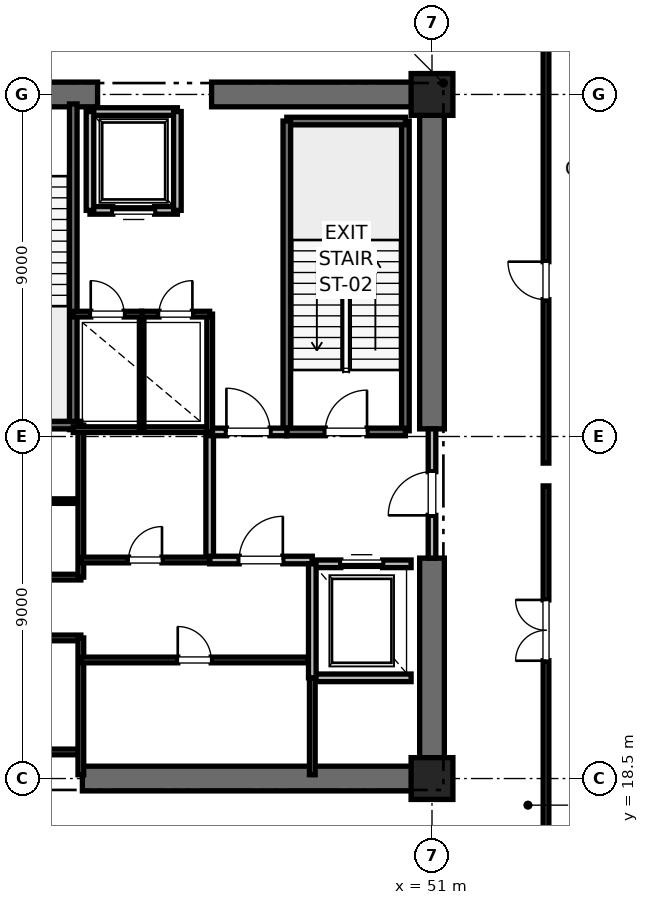
"""IFC4 building model, lengths in metres.
Left out: names, types, materials, properties, quantities, classifications, styles, units other than length and angle.
Written with IfcOpenShell. Run it as: python <this file> out.ifc"""

import sys

from ifc_helpers import new_model, si_unit, direction, frame, frame_2d, origin, origin_2d, place, context, subcontext, project, spatial, rectangle, extrude, element, fill, save


model = new_model("IFC4")
c1 = context("Model", 3, precision=1e-05, world=origin(), true_north=direction((0.0, 1.0)))
c2 = subcontext(c1, "Body", "Model", "MODEL_VIEW")
j1 = project(units=[si_unit("LENGTHUNIT", "METRE"), si_unit("PLANEANGLEUNIT", "RADIAN")], contexts=[c1])
p1 = place(None, origin())
s1 = spatial("IfcSite", under=j1, at=p1, CompositionType="ELEMENT")
p2 = place(p1, origin())
s2 = spatial("IfcBuilding", under=s1, at=p2, CompositionType="ELEMENT")
p3 = place(p2, frame((0.0, 0.0, -4.5)))
s3 = spatial("IfcBuildingStorey", under=s2, at=p3, CompositionType="ELEMENT", Elevation=-4.5)
for number, where, z_axis, x_axis in (
    (1, (51.0, 18.5, 0.0), (0.0, 0.0, 1.0), (1.0, 0.0, 0.0)),
    (2, (51.0, 36.5, 0.0), (0.0, 0.0, 1.0), (1.0, 0.0, 0.0)),
):
    element("IfcColumn", number, at=place(p3, frame(where, z_axis=z_axis, x_axis=x_axis)), inside=s3, PredefinedType="PILASTER", context=c2, shape_type="SweptSolid", body=[
        extrude(rectangle(XDim=1.1, YDim=1.1, at=origin_2d()), origin(), (0.0, 0.0, 1.0), 4.5),
    ])
p4 = place(p3, frame((41.8, 18.5, 0.0), z_axis=(0.0, 0.0, 1.0), x_axis=(1.0, 0.0, 0.0)))
e3 = element("IfcWall", 3, at=p4, inside=s3, PredefinedType="SHEAR", context=c2, shape_type="SweptSolid", body=[
    extrude(rectangle(XDim=9.2, YDim=0.65, at=frame_2d((4.6, 0.0))), origin(), (0.0, 0.0, 1.0), 4.22),
])
p5 = place(p3, frame((37.8, 36.5, 0.0), z_axis=(0.0, 0.0, 1.0), x_axis=(1.0, 0.0, 0.0)))
e4 = element("IfcWall", 4, at=p5, inside=s3, PredefinedType="SHEAR", context=c2, shape_type="SweptSolid", body=[
    extrude(rectangle(XDim=4.4, YDim=0.65, at=frame_2d((2.2, 0.0))), origin(), (0.0, 0.0, 1.0), 4.22),
])
p6 = place(p5, frame((1.65, 0.0, 0.0)))
e5 = element("IfcOpeningElement", 5, at=p6, cuts=e4, PredefinedType="OPENING", context=c2, shape_type="SweptSolid", body=[
    extrude(rectangle(XDim=1.1, YDim=2.15, at=frame_2d((0.55, 1.075))), frame((0.0, 0.325, 0.0), z_axis=(0.0, -1.0, 0.0), x_axis=(1.0, 0.0, 0.0)), (0.0, 0.0, 1.0), 0.65),
])
for number, where, z_axis, x_axis in (
    (6, (45.2, 36.5, 0.0), (0.0, 0.0, 1.0), (1.0, 0.0, 0.0)),
    (7, (51.0, 18.5, 0.0), (0.0, 0.0, 1.0), (0.0, 1.0, 0.0)),
):
    element("IfcWall", number, at=place(p3, frame(where, z_axis=z_axis, x_axis=x_axis)), inside=s3, PredefinedType="SHEAR", context=c2, shape_type="SweptSolid", body=[
        extrude(rectangle(XDim=5.8, YDim=0.65, at=frame_2d((2.9, 0.0))), origin(), (0.0, 0.0, 1.0), 4.22),
    ])
p7 = place(p3, frame((51.0, 27.7, 0.0), z_axis=(0.0, 0.0, 1.0), x_axis=(0.0, 1.0, 0.0)))
e8 = element("IfcWall", 8, at=p7, inside=s3, PredefinedType="SHEAR", context=c2, shape_type="SweptSolid", body=[
    extrude(rectangle(XDim=8.8, YDim=0.65, at=frame_2d((4.4, 0.0))), origin(), (0.0, 0.0, 1.0), 4.22),
])
p8 = place(p3, frame((50.3, 27.65, 0.0), z_axis=(0.0, 0.0, 1.0), x_axis=(0.0, 1.0, 0.0)))
e9 = element("IfcWall", 9, at=p8, inside=s3, PredefinedType="SOLIDWALL", context=c2, shape_type="SweptSolid", body=[
    extrude(rectangle(XDim=8.15, YDim=0.2, at=frame_2d((4.075, 0.0))), origin(), (0.0, 0.0, 1.0), 4.22),
])
p9 = place(p3, frame((47.18, 35.8, 0.0), z_axis=(0.0, 0.0, 1.0), x_axis=(1.0, 0.0, 0.0)))
e10 = element("IfcWall", 10, at=p9, inside=s3, PredefinedType="SOLIDWALL", context=c2, shape_type="SweptSolid", body=[
    extrude(rectangle(XDim=3.12, YDim=0.2, at=frame_2d((1.56, 0.0))), origin(), (0.0, 0.0, 1.0), 4.22),
])
p10 = place(p3, frame((47.18, 27.62, 0.0), z_axis=(0.0, 0.0, 1.0), x_axis=(0.0, 1.0, 0.0)))
e11 = element("IfcWall", 11, at=p10, inside=s3, PredefinedType="SOLIDWALL", context=c2, shape_type="SweptSolid", body=[
    extrude(rectangle(XDim=8.18, YDim=0.2, at=frame_2d((4.09, 0.0))), origin(), (0.0, 0.0, 1.0), 4.22),
])
p11 = place(p3, frame((47.18, 27.62, 0.0), z_axis=(0.0, 0.0, 1.0), x_axis=(1.0, 0.0, 0.0)))
e12 = element("IfcWall", 12, at=p11, inside=s3, PredefinedType="SOLIDWALL", context=c2, shape_type="SweptSolid", body=[
    extrude(rectangle(XDim=3.12, YDim=0.2, at=frame_2d((1.56, 0.0))), origin(), (0.0, 0.0, 1.0), 4.22),
])
p12 = place(p11, frame((1.01, 0.0, 0.0)))
e13 = element("IfcOpeningElement", 13, at=p12, cuts=e12, PredefinedType="OPENING", context=c2, shape_type="SweptSolid", body=[
    extrude(rectangle(XDim=1.1, YDim=2.15, at=frame_2d((0.55, 1.075))), frame((0.0, 0.1, 0.0), z_axis=(0.0, -1.0, 0.0), x_axis=(1.0, 0.0, 0.0)), (0.0, 0.0, 1.0), 0.2),
])
p13 = place(p3, frame((41.56, 27.68, 0.0), z_axis=(0.0, 0.0, 1.0), x_axis=(0.0, 1.0, 0.0)))
e14 = element("IfcWall", 14, at=p13, inside=s3, PredefinedType="SOLIDWALL", context=c2, shape_type="SweptSolid", body=[
    extrude(rectangle(XDim=8.57, YDim=0.2, at=frame_2d((4.285, 0.0))), origin(), (0.0, 0.0, 1.0), 4.22),
])
p14 = place(p3, frame((38.44, 27.8, 0.0), z_axis=(0.0, 0.0, 1.0), x_axis=(1.0, 0.0, 0.0)))
e15 = element("IfcWall", 15, at=p14, inside=s3, PredefinedType="SOLIDWALL", context=c2, shape_type="SweptSolid", body=[
    extrude(rectangle(XDim=3.32, YDim=0.2, at=frame_2d((1.66, 0.0))), origin(), (0.0, 0.0, 1.0), 4.22),
])
p15 = place(p3, frame((45.15, 24.25, 0.0), z_axis=(0.0, 0.0, 1.0), x_axis=(0.0, 1.0, 0.0)))
e16 = element("IfcWall", 16, at=p15, inside=s3, PredefinedType="PARTITIONING", context=c2, shape_type="SweptSolid", body=[
    extrude(rectangle(XDim=3.37, YDim=0.2, at=frame_2d((1.685, 0.0))), origin(), (0.0, 0.0, 1.0), 4.22),
])
p16 = place(p3, frame((45.15, 24.25, 0.0), z_axis=(0.0, 0.0, 1.0), x_axis=(1.0, 0.0, 0.0)))
e17 = element("IfcWall", 17, at=p16, inside=s3, PredefinedType="PARTITIONING", context=c2, shape_type="SweptSolid", body=[
    extrude(rectangle(XDim=2.7, YDim=0.2, at=frame_2d((1.35, 0.0))), origin(), (0.0, 0.0, 1.0), 4.22),
])
p17 = place(p16, frame((0.775, 0.0, 0.0)))
e18 = element("IfcOpeningElement", 18, at=p17, cuts=e17, PredefinedType="OPENING", context=c2, shape_type="SweptSolid", body=[
    extrude(rectangle(XDim=1.15, YDim=2.2, at=frame_2d((0.575, 1.1))), frame((0.0, 0.1, 0.0), z_axis=(0.0, -1.0, 0.0), x_axis=(1.0, 0.0, 0.0)), (0.0, 0.0, 1.0), 0.2),
])
p18 = place(p3, frame((45.15, 27.62, 0.0), z_axis=(0.0, 0.0, 1.0), x_axis=(1.0, 0.0, 0.0)))
e19 = element("IfcWall", 19, at=p18, inside=s3, PredefinedType="PARTITIONING", context=c2, shape_type="SweptSolid", body=[
    extrude(rectangle(XDim=2.03, YDim=0.2, at=frame_2d((1.015, 0.0))), origin(), (0.0, 0.0, 1.0), 4.22),
])
p19 = place(p18, frame((0.44, 0.0, 0.0)))
e20 = element("IfcOpeningElement", 20, at=p19, cuts=e19, PredefinedType="OPENING", context=c2, shape_type="SweptSolid", body=[
    extrude(rectangle(XDim=1.15, YDim=2.2, at=frame_2d((0.575, 1.1))), frame((0.0, 0.1, 0.0), z_axis=(0.0, -1.0, 0.0), x_axis=(1.0, 0.0, 0.0)), (0.0, 0.0, 1.0), 0.2),
])
p20 = place(p3, frame((51.0, 24.3, 0.0), z_axis=(0.0, 0.0, 1.0), x_axis=(0.0, 1.0, 0.0)))
e21 = element("IfcWall", 21, at=p20, inside=s3, PredefinedType="PARTITIONING", context=c2, shape_type="SweptSolid", body=[
    extrude(rectangle(XDim=3.4, YDim=0.2, at=frame_2d((1.7, 0.0))), origin(), (0.0, 0.0, 1.0), 3.0),
])
p21 = place(p20, frame((1.125, 0.0, 0.0)))
e22 = element("IfcOpeningElement", 22, at=p21, cuts=e21, PredefinedType="OPENING", context=c2, shape_type="SweptSolid", body=[
    extrude(rectangle(XDim=1.15, YDim=2.2, at=frame_2d((0.575, 1.1))), frame((0.0, 0.1, 0.0), z_axis=(0.0, -1.0, 0.0), x_axis=(1.0, 0.0, 0.0)), (0.0, 0.0, 1.0), 0.2),
])
p22 = place(p3, frame((47.85, 21.15, 0.0), z_axis=(0.0, 0.0, 1.0), x_axis=(1.0, 0.0, 0.0)))
e23 = element("IfcWall", 23, at=p22, inside=s3, PredefinedType="SOLIDWALL", context=c2, shape_type="SweptSolid", body=[
    extrude(rectangle(XDim=2.6, YDim=0.2, at=frame_2d((1.3, 0.0))), origin(), (0.0, 0.0, 1.0), 4.22),
])
p23 = place(p3, frame((50.45, 24.15, 0.0), z_axis=(0.0, 0.0, 1.0), x_axis=(-1.0, 0.0, 0.0)))
e24 = element("IfcWall", 24, at=p23, inside=s3, PredefinedType="SOLIDWALL", context=c2, shape_type="SweptSolid", body=[
    extrude(rectangle(XDim=2.6, YDim=0.2, at=frame_2d((1.3, 0.0))), origin(), (0.0, 0.0, 1.0), 3.0),
])
p24 = place(p23, frame((0.75, 0.0, 0.0)))
e25 = element("IfcOpeningElement", 25, at=p24, cuts=e24, PredefinedType="OPENING", context=c2, shape_type="SweptSolid", body=[
    extrude(rectangle(XDim=1.1, YDim=2.2, at=frame_2d((0.55, 1.1))), frame((0.0, 0.1, 0.0), z_axis=(0.0, -1.0, 0.0), x_axis=(1.0, 0.0, 0.0)), (0.0, 0.0, 1.0), 0.2),
])
p25 = place(p3, frame((47.85, 24.15, 0.0), z_axis=(0.0, 0.0, 1.0), x_axis=(0.0, -1.0, 0.0)))
e26 = element("IfcWall", 26, at=p25, inside=s3, PredefinedType="SOLIDWALL", context=c2, shape_type="SweptSolid", body=[
    extrude(rectangle(XDim=3.0, YDim=0.2, at=frame_2d((1.5, 0.0))), origin(), (0.0, 0.0, 1.0), 4.22),
])
p26 = place(p3, frame((42.0, 33.45, 0.0), z_axis=(0.0, 0.0, 1.0), x_axis=(1.0, 0.0, 0.0)))
e27 = element("IfcWall", 27, at=p26, inside=s3, PredefinedType="SOLIDWALL", context=c2, shape_type="SweptSolid", body=[
    extrude(rectangle(XDim=2.3, YDim=0.2, at=frame_2d((1.15, 0.0))), origin(), (0.0, 0.0, 1.0), 4.22),
])
p27 = place(p26, frame((0.6, 0.0, 0.0)))
e28 = element("IfcOpeningElement", 28, at=p27, cuts=e27, PredefinedType="OPENING", context=c2, shape_type="SweptSolid", body=[
    extrude(rectangle(XDim=1.1, YDim=2.2, at=frame_2d((0.55, 1.1))), frame((0.0, 0.1, 0.0), z_axis=(0.0, -1.0, 0.0), x_axis=(1.0, 0.0, 0.0)), (0.0, 0.0, 1.0), 0.2),
])
p28 = place(p3, frame((44.3, 36.05, 0.0), z_axis=(0.0, 0.0, 1.0), x_axis=(-1.0, 0.0, 0.0)))
e29 = element("IfcWall", 29, at=p28, inside=s3, PredefinedType="SOLIDWALL", context=c2, shape_type="SweptSolid", body=[
    extrude(rectangle(XDim=2.3, YDim=0.2, at=frame_2d((1.15, 0.0))), origin(), (0.0, 0.0, 1.0), 3.0),
])
for number, where, z_axis, x_axis in (
    (30, (42.0, 36.05, 0.0), (0.0, 0.0, 1.0), (0.0, -1.0, 0.0)),
    (31, (44.3, 33.45, 0.0), (0.0, 0.0, 1.0), (0.0, 1.0, 0.0)),
):
    element("IfcWall", number, at=place(p3, frame(where, z_axis=z_axis, x_axis=x_axis)), inside=s3, PredefinedType="SOLIDWALL", context=c2, shape_type="SweptSolid", body=[
        extrude(rectangle(XDim=2.6, YDim=0.2, at=frame_2d((1.3, 0.0))), origin(), (0.0, 0.0, 1.0), 3.0),
    ])
for number, where, z_axis, x_axis in (
    (32, (39.95, 19.2, 0.0), (0.0, 0.0, 1.0), (1.0, 0.0, 0.0)),
    (33, (39.95, 22.2, 0.0), (0.0, 0.0, 1.0), (1.0, 0.0, 0.0)),
    (34, (39.95, 23.8, 0.0), (0.0, 0.0, 1.0), (1.0, 0.0, 0.0)),
):
    element("IfcWall", number, at=place(p3, frame(where, z_axis=z_axis, x_axis=x_axis)), inside=s3, PredefinedType="PARTITIONING", context=c2, shape_type="SweptSolid", body=[
        extrude(rectangle(XDim=1.81, YDim=0.15, at=frame_2d((0.905, 0.0))), origin(), (0.0, 0.0, 1.0), 2.85),
    ])
p29 = place(p3, frame((39.95, 25.8, 0.0), z_axis=(0.0, 0.0, 1.0), x_axis=(1.0, 0.0, 0.0)))
e35 = element("IfcWall", 35, at=p29, inside=s3, PredefinedType="PARTITIONING", context=c2, shape_type="SweptSolid", body=[
    extrude(rectangle(XDim=1.81, YDim=0.12, at=frame_2d((0.905, 0.0))), origin(), (0.0, 0.0, 1.0), 2.85),
])
p30 = place(p3, frame((41.76, 18.6, 0.0), z_axis=(0.0, 0.0, 1.0), x_axis=(0.0, 1.0, 0.0)))
e36 = element("IfcWall", 36, at=p30, inside=s3, PredefinedType="PARTITIONING", context=c2, shape_type="SweptSolid", body=[
    extrude(rectangle(XDim=3.6, YDim=0.15, at=frame_2d((1.8, 0.0))), origin(), (0.0, 0.0, 1.0), 2.85),
])
p31 = place(p3, frame((41.76, 23.8, 0.0), z_axis=(0.0, 0.0, 1.0), x_axis=(0.0, 1.0, 0.0)))
e37 = element("IfcWall", 37, at=p31, inside=s3, PredefinedType="PARTITIONING", context=c2, shape_type="SweptSolid", body=[
    extrude(rectangle(XDim=4.0, YDim=0.15, at=frame_2d((2.0, 0.0))), origin(), (0.0, 0.0, 1.0), 2.85),
])
p32 = place(p3, frame((41.56, 27.68, 0.0), z_axis=(0.0, 0.0, 1.0), x_axis=(1.0, 0.0, 0.0)))
e38 = element("IfcWall", 38, at=p32, inside=s3, PredefinedType="PARTITIONING", context=c2, shape_type="SweptSolid", body=[
    extrude(rectangle(XDim=3.59, YDim=0.15, at=frame_2d((1.795, 0.0))), origin(), (0.0, 0.0, 1.0), 2.85),
])
p33 = place(p3, frame((47.85, 18.6, 0.0), z_axis=(0.0, 0.0, 1.0), x_axis=(0.0, 1.0, 0.0)))
e39 = element("IfcWall", 39, at=p33, inside=s3, PredefinedType="PARTITIONING", context=c2, shape_type="SweptSolid", body=[
    extrude(rectangle(XDim=2.54, YDim=0.15, at=frame_2d((1.27, 0.0))), origin(), (0.0, 0.0, 1.0), 2.85),
])
p34 = place(p3, frame((41.76, 21.62, 0.0), z_axis=(0.0, 0.0, 1.0), x_axis=(1.0, 0.0, 0.0)))
e40 = element("IfcWall", 40, at=p34, inside=s3, PredefinedType="PARTITIONING", context=c2, shape_type="SweptSolid", body=[
    extrude(rectangle(XDim=5.98, YDim=0.15, at=frame_2d((2.99, 0.0))), origin(), (0.0, 0.0, 1.0), 2.85),
])
p35 = place(p34, frame((2.55, 0.0, 0.0)))
e41 = element("IfcOpeningElement", 41, at=p35, cuts=e40, PredefinedType="OPENING", context=c2, shape_type="SweptSolid", body=[
    extrude(rectangle(XDim=0.88, YDim=2.1, at=frame_2d((0.44, 1.05))), frame((0.0, 0.075, 0.0), z_axis=(0.0, -1.0, 0.0), x_axis=(1.0, 0.0, 0.0)), (0.0, 0.0, 1.0), 0.15),
])
p36 = place(p3, frame((41.76, 24.25, 0.0), z_axis=(0.0, 0.0, 1.0), x_axis=(1.0, 0.0, 0.0)))
e42 = element("IfcWall", 42, at=p36, inside=s3, PredefinedType="PARTITIONING", context=c2, shape_type="SweptSolid", body=[
    extrude(rectangle(XDim=3.39, YDim=0.15, at=frame_2d((1.695, 0.0))), origin(), (0.0, 0.0, 1.0), 2.85),
])
p37 = place(p36, frame((1.255, 0.0, 0.0)))
e43 = element("IfcOpeningElement", 43, at=p37, cuts=e42, PredefinedType="OPENING", context=c2, shape_type="SweptSolid", body=[
    extrude(rectangle(XDim=0.88, YDim=2.1, at=frame_2d((0.44, 1.05))), frame((0.0, 0.075, 0.0), z_axis=(0.0, -1.0, 0.0), x_axis=(1.0, 0.0, 0.0)), (0.0, 0.0, 1.0), 0.15),
])
p38 = place(p3, frame((45.15, 27.62, 0.0), z_axis=(0.0, 0.0, 1.0), x_axis=(0.0, 1.0, 0.0)))
e44 = element("IfcWall", 44, at=p38, inside=s3, PredefinedType="PARTITIONING", context=c2, shape_type="SweptSolid", body=[
    extrude(rectangle(XDim=3.1, YDim=0.15, at=frame_2d((1.55, 0.0))), origin(), (0.0, 0.0, 1.0), 2.85),
])
p39 = place(p3, frame((43.36, 27.68, 0.0), z_axis=(0.0, 0.0, 1.0), x_axis=(0.0, 1.0, 0.0)))
e45 = element("IfcWall", 45, at=p39, inside=s3, PredefinedType="PARTITIONING", context=c2, shape_type="SweptSolid", body=[
    extrude(rectangle(XDim=3.04, YDim=0.12, at=frame_2d((1.52, 0.0))), origin(), (0.0, 0.0, 1.0), 2.85),
])
p40 = place(p3, frame((41.56, 30.72, 0.0), z_axis=(0.0, 0.0, 1.0), x_axis=(1.0, 0.0, 0.0)))
e46 = element("IfcWall", 46, at=p40, inside=s3, PredefinedType="PARTITIONING", context=c2, shape_type="SweptSolid", body=[
    extrude(rectangle(XDim=1.8, YDim=0.15, at=frame_2d((0.9, 0.0))), origin(), (0.0, 0.0, 1.0), 2.85),
])
p41 = place(p40, frame((0.46, 0.0, 0.0)))
e47 = element("IfcOpeningElement", 47, at=p41, cuts=e46, PredefinedType="OPENING", context=c2, shape_type="SweptSolid", body=[
    extrude(rectangle(XDim=0.88, YDim=2.1, at=frame_2d((0.44, 1.05))), frame((0.0, 0.075, 0.0), z_axis=(0.0, -1.0, 0.0), x_axis=(1.0, 0.0, 0.0)), (0.0, 0.0, 1.0), 0.15),
])
p42 = place(p3, frame((43.36, 30.72, 0.0), z_axis=(0.0, 0.0, 1.0), x_axis=(1.0, 0.0, 0.0)))
e48 = element("IfcWall", 48, at=p42, inside=s3, PredefinedType="PARTITIONING", context=c2, shape_type="SweptSolid", body=[
    extrude(rectangle(XDim=1.79, YDim=0.15, at=frame_2d((0.895, 0.0))), origin(), (0.0, 0.0, 1.0), 2.85),
])
p43 = place(p42, frame((0.455, 0.0, 0.0)))
e49 = element("IfcOpeningElement", 49, at=p43, cuts=e48, PredefinedType="OPENING", context=c2, shape_type="SweptSolid", body=[
    extrude(rectangle(XDim=0.88, YDim=2.1, at=frame_2d((0.44, 1.05))), frame((0.0, 0.075, 0.0), z_axis=(0.0, -1.0, 0.0), x_axis=(1.0, 0.0, 0.0)), (0.0, 0.0, 1.0), 0.15),
])
p44 = place(p3, frame((54.0, 14.0, 0.0), z_axis=(0.0, 0.0, 1.0), x_axis=(0.0, 1.0, 0.0)))
e50 = element("IfcWall", 50, at=p44, inside=s3, PredefinedType="PARTITIONING", context=c2, shape_type="SweptSolid", body=[
    extrude(rectangle(XDim=12.2, YDim=0.15, at=frame_2d((6.1, 0.0))), origin(), (0.0, 0.0, 1.0), 2.85),
])
p45 = place(p44, frame((7.6, 0.0, 0.0)))
e51 = element("IfcOpeningElement", 51, at=p45, cuts=e50, PredefinedType="OPENING", context=c2, shape_type="SweptSolid", body=[
    extrude(rectangle(XDim=1.6, YDim=2.25, at=frame_2d((0.8, 1.125))), frame((0.0, 0.075, 0.0), z_axis=(0.0, -1.0, 0.0), x_axis=(1.0, 0.0, 0.0)), (0.0, 0.0, 1.0), 0.15),
])
p46 = place(p3, frame((54.0, 26.8, 0.0), z_axis=(0.0, 0.0, 1.0), x_axis=(0.0, 1.0, 0.0)))
e52 = element("IfcWall", 52, at=p46, inside=s3, PredefinedType="PARTITIONING", context=c2, shape_type="SweptSolid", body=[
    extrude(rectangle(XDim=12.2, YDim=0.15, at=frame_2d((6.1, 0.0))), origin(), (0.0, 0.0, 1.0), 2.85),
])
p47 = place(p46, frame((4.3, 0.0, 0.0)))
e53 = element("IfcOpeningElement", 53, at=p47, cuts=e52, PredefinedType="OPENING", context=c2, shape_type="SweptSolid", body=[
    extrude(rectangle(XDim=1.0, YDim=2.15, at=frame_2d((0.5, 1.075))), frame((0.0, 0.075, 0.0), z_axis=(0.0, -1.0, 0.0), x_axis=(1.0, 0.0, 0.0)), (0.0, 0.0, 1.0), 0.15),
])
p48 = place(p12, origin())
e54 = element("IfcDoor", 54, at=p48, inside=s3, OperationType="SINGLE_SWING_RIGHT", PredefinedType="DOOR", context=c2, shape_type="SweptSolid", body=[
    extrude(rectangle(XDim=1.1, YDim=2.15, at=frame_2d((0.55, 1.075))), frame((0.0, 0.025, 0.0), z_axis=(0.0, -1.0, 0.0), x_axis=(1.0, 0.0, 0.0)), (0.0, 0.0, 1.0), 0.05),
])
fill(e13, e54)
p49 = place(p17, origin())
e55 = element("IfcDoor", 55, at=p49, inside=s3, OperationType="SINGLE_SWING_RIGHT", PredefinedType="DOOR", context=c2, shape_type="SweptSolid", body=[
    extrude(rectangle(XDim=1.15, YDim=2.2, at=frame_2d((0.575, 1.1))), frame((0.0, 0.025, 0.0), z_axis=(0.0, -1.0, 0.0), x_axis=(1.0, 0.0, 0.0)), (0.0, 0.0, 1.0), 0.05),
])
fill(e18, e55)
p50 = place(p19, origin())
e56 = element("IfcDoor", 56, at=p50, inside=s3, OperationType="SINGLE_SWING_LEFT", PredefinedType="DOOR", context=c2, shape_type="SweptSolid", body=[
    extrude(rectangle(XDim=1.15, YDim=2.2, at=frame_2d((0.575, 1.1))), frame((0.0, 0.025, 0.0), z_axis=(0.0, -1.0, 0.0), x_axis=(1.0, 0.0, 0.0)), (0.0, 0.0, 1.0), 0.05),
])
fill(e20, e56)
p51 = place(p21, origin())
e57 = element("IfcDoor", 57, at=p51, inside=s3, OperationType="SINGLE_SWING_LEFT", PredefinedType="DOOR", context=c2, shape_type="SweptSolid", body=[
    extrude(rectangle(XDim=1.15, YDim=2.2, at=frame_2d((0.575, 1.1))), frame((0.0, 0.025, 0.0), z_axis=(0.0, -1.0, 0.0), x_axis=(1.0, 0.0, 0.0)), (0.0, 0.0, 1.0), 0.05),
])
fill(e22, e57)
p52 = place(p24, origin())
e58 = element("IfcDoor", 58, at=p52, inside=s3, OperationType="SLIDING_TO_RIGHT", PredefinedType="DOOR", context=c2, shape_type="SweptSolid", body=[
    extrude(rectangle(XDim=1.1, YDim=2.2, at=frame_2d((0.55, 1.1))), frame((0.0, 0.025, 0.0), z_axis=(0.0, -1.0, 0.0), x_axis=(1.0, 0.0, 0.0)), (0.0, 0.0, 1.0), 0.05),
])
fill(e25, e58)
p53 = place(p27, origin())
e59 = element("IfcDoor", 59, at=p53, inside=s3, OperationType="SLIDING_TO_RIGHT", PredefinedType="DOOR", context=c2, shape_type="SweptSolid", body=[
    extrude(rectangle(XDim=1.1, YDim=2.2, at=frame_2d((0.55, 1.1))), frame((0.0, 0.025, 0.0), z_axis=(0.0, -1.0, 0.0), x_axis=(1.0, 0.0, 0.0)), (0.0, 0.0, 1.0), 0.05),
])
fill(e28, e59)
p54 = place(p35, origin())
e60 = element("IfcDoor", 60, at=p54, inside=s3, OperationType="SINGLE_SWING_LEFT", PredefinedType="DOOR", context=c2, shape_type="SweptSolid", body=[
    extrude(rectangle(XDim=0.88, YDim=2.1, at=frame_2d((0.44, 1.05))), frame((0.0, 0.025, 0.0), z_axis=(0.0, -1.0, 0.0), x_axis=(1.0, 0.0, 0.0)), (0.0, 0.0, 1.0), 0.05),
])
fill(e41, e60)
p55 = place(p37, origin())
e61 = element("IfcDoor", 61, at=p55, inside=s3, OperationType="SINGLE_SWING_RIGHT", PredefinedType="DOOR", context=c2, shape_type="SweptSolid", body=[
    extrude(rectangle(XDim=0.88, YDim=2.1, at=frame_2d((0.44, 1.05))), frame((0.0, 0.025, 0.0), z_axis=(0.0, -1.0, 0.0), x_axis=(1.0, 0.0, 0.0)), (0.0, 0.0, 1.0), 0.05),
])
fill(e43, e61)
p56 = place(p41, origin())
e62 = element("IfcDoor", 62, at=p56, inside=s3, OperationType="SINGLE_SWING_LEFT", PredefinedType="DOOR", context=c2, shape_type="SweptSolid", body=[
    extrude(rectangle(XDim=0.88, YDim=2.1, at=frame_2d((0.44, 1.05))), frame((0.0, 0.025, 0.0), z_axis=(0.0, -1.0, 0.0), x_axis=(1.0, 0.0, 0.0)), (0.0, 0.0, 1.0), 0.05),
])
fill(e47, e62)
p57 = place(p43, origin())
e63 = element("IfcDoor", 63, at=p57, inside=s3, OperationType="SINGLE_SWING_RIGHT", PredefinedType="DOOR", context=c2, shape_type="SweptSolid", body=[
    extrude(rectangle(XDim=0.88, YDim=2.1, at=frame_2d((0.44, 1.05))), frame((0.0, 0.025, 0.0), z_axis=(0.0, -1.0, 0.0), x_axis=(1.0, 0.0, 0.0)), (0.0, 0.0, 1.0), 0.05),
])
fill(e49, e63)
p58 = place(p45, origin())
e64 = element("IfcDoor", 64, at=p58, inside=s3, OperationType="DOUBLE_DOOR_SINGLE_SWING", PredefinedType="DOOR", context=c2, shape_type="SweptSolid", body=[
    extrude(rectangle(XDim=1.6, YDim=2.25, at=frame_2d((0.8, 1.125))), frame((0.0, 0.025, 0.0), z_axis=(0.0, -1.0, 0.0), x_axis=(1.0, 0.0, 0.0)), (0.0, 0.0, 1.0), 0.05),
])
fill(e51, e64)
p59 = place(p47, origin())
e65 = element("IfcDoor", 65, at=p59, inside=s3, OperationType="SINGLE_SWING_RIGHT", PredefinedType="DOOR", context=c2, shape_type="SweptSolid", body=[
    extrude(rectangle(XDim=1.0, YDim=2.15, at=frame_2d((0.5, 1.075))), frame((0.0, 0.025, 0.0), z_axis=(0.0, -1.0, 0.0), x_axis=(1.0, 0.0, 0.0)), (0.0, 0.0, 1.0), 0.05),
])
fill(e53, e65)
save(model, sys.argv[1])
